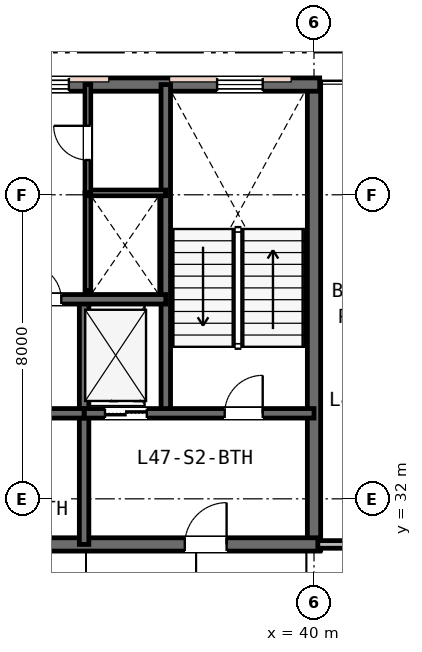
"""IFC4 building model, lengths in metres.
Left out: names, types, materials, properties, quantities, classifications, styles, units other than length and angle.
Written with IfcOpenShell. Run it as: python <this file> out.ifc"""

import sys

from ifc_helpers import new_model, si_unit, direction, frame, frame_2d, origin, place, context, subcontext, project, spatial, rectangle, extrude, element, fill, save


model = new_model("IFC4")
c1 = context("Model", 3, precision=1e-05, world=origin(), true_north=direction((0.0, 1.0)))
c2 = subcontext(c1, "Body", "Model", "MODEL_VIEW")
j1 = project(units=[si_unit("LENGTHUNIT", "METRE"), si_unit("PLANEANGLEUNIT", "RADIAN")], contexts=[c1])
p1 = place(None, origin())
s1 = spatial("IfcSite", under=j1, at=p1, CompositionType="ELEMENT")
p2 = place(p1, origin())
s2 = spatial("IfcBuilding", under=s1, at=p2, CompositionType="ELEMENT")
p3 = place(p2, frame((0.0, 0.0, 183.0)))
s3 = spatial("IfcBuildingStorey", under=s2, at=p3, CompositionType="ELEMENT", Elevation=183.0)
p4 = place(p3, frame((40.0, 30.65, 0.0), z_axis=(0.0, 0.0, 1.0), x_axis=(0.0, 1.0, 0.0)))
e1 = element("IfcWall", 1, at=p4, inside=s3, PredefinedType="SHEAR", context=c2, shape_type="SweptSolid", body=[
    extrude(rectangle(XDim=12.3, YDim=0.35, at=frame_2d((6.15, 0.0))), origin(), (0.0, 0.0, 1.0), 3.6),
])
p5 = place(p3, frame((15.85, 42.9, 0.0), z_axis=(0.0, 0.0, 1.0), x_axis=(1.0, 0.0, 0.0)))
e2 = element("IfcWall", 2, at=p5, inside=s3, PredefinedType="SHEAR", context=c2, shape_type="SweptSolid", body=[
    extrude(rectangle(XDim=24.3, YDim=0.35, at=frame_2d((12.15, 0.0))), origin(), (0.0, 0.0, 1.0), 3.6),
])
p6 = place(p5, frame((1.6, 0.0, 0.95)))
e3 = element("IfcOpeningElement", 3, at=p6, cuts=e2, PredefinedType="OPENING", context=c2, shape_type="SweptSolid", body=[
    extrude(rectangle(XDim=1.2, YDim=1.6, at=frame_2d((0.6, 0.8))), frame((0.0, 0.185, 0.0), z_axis=(0.0, -1.0, 0.0), x_axis=(1.0, 0.0, 0.0)), (0.0, 0.0, 1.0), 0.37),
])
p7 = place(p5, frame((16.5, 0.0, 0.95)))
e4 = element("IfcOpeningElement", 4, at=p7, cuts=e2, PredefinedType="OPENING", context=c2, shape_type="SweptSolid", body=[
    extrude(rectangle(XDim=1.2, YDim=1.6, at=frame_2d((0.6, 0.8))), frame((0.0, 0.185, 0.0), z_axis=(0.0, -1.0, 0.0), x_axis=(1.0, 0.0, 0.0)), (0.0, 0.0, 1.0), 0.37),
])
p8 = place(p5, frame((21.6, 0.0, 0.95)))
e5 = element("IfcOpeningElement", 5, at=p8, cuts=e2, PredefinedType="OPENING", context=c2, shape_type="SweptSolid", body=[
    extrude(rectangle(XDim=1.2, YDim=1.6, at=frame_2d((0.6, 0.8))), frame((0.0, 0.185, 0.0), z_axis=(0.0, -1.0, 0.0), x_axis=(1.0, 0.0, 0.0)), (0.0, 0.0, 1.0), 0.37),
])
p9 = place(p3, frame((28.95, 30.8, 0.0), z_axis=(0.0, 0.0, 1.0), x_axis=(1.0, 0.0, 0.0)))
e6 = element("IfcWall", 6, at=p9, inside=s3, PredefinedType="SHEAR", context=c2, shape_type="SweptSolid", body=[
    extrude(rectangle(XDim=11.2, YDim=0.35, at=frame_2d((5.6, 0.0))), origin(), (0.0, 0.0, 1.0), 3.6),
])
p10 = place(p9, frame((7.65, 0.0, 0.0)))
e7 = element("IfcOpeningElement", 7, at=p10, cuts=e6, PredefinedType="OPENING", context=c2, shape_type="SweptSolid", body=[
    extrude(rectangle(XDim=1.1, YDim=2.15, at=frame_2d((0.55, 1.075))), frame((0.0, 0.185, 0.0), z_axis=(0.0, -1.0, 0.0), x_axis=(1.0, 0.0, 0.0)), (0.0, 0.0, 1.0), 0.37),
])
p11 = place(p3, frame((36.1, 34.25, 0.0), z_axis=(0.0, 0.0, 1.0), x_axis=(0.0, 1.0, 0.0)))
e8 = element("IfcWall", 8, at=p11, inside=s3, PredefinedType="SHEAR", context=c2, shape_type="SweptSolid", body=[
    extrude(rectangle(XDim=8.65, YDim=0.25, at=frame_2d((4.325, 0.0))), origin(), (0.0, 0.0, 1.0), 3.6),
])
p12 = place(p3, frame((33.95, 30.8, 0.0), z_axis=(0.0, 0.0, 1.0), x_axis=(0.0, 1.0, 0.0)))
e9 = element("IfcWall", 9, at=p12, inside=s3, PredefinedType="SHEAR", context=c2, shape_type="SweptSolid", body=[
    extrude(rectangle(XDim=6.45, YDim=0.25, at=frame_2d((3.225, 0.0))), origin(), (0.0, 0.0, 1.0), 3.6),
])
p13 = place(p3, frame((33.95, 34.25, 0.0), z_axis=(0.0, 0.0, 1.0), x_axis=(1.0, 0.0, 0.0)))
e10 = element("IfcWall", 10, at=p13, inside=s3, PredefinedType="SHEAR", context=c2, shape_type="SweptSolid", body=[
    extrude(rectangle(XDim=6.05, YDim=0.25, at=frame_2d((3.025, 0.0))), origin(), (0.0, 0.0, 1.0), 3.6),
])
p14 = place(p13, frame((3.7, 0.0, 0.0)))
e11 = element("IfcOpeningElement", 11, at=p14, cuts=e10, PredefinedType="OPENING", context=c2, shape_type="SweptSolid", body=[
    extrude(rectangle(XDim=1.0, YDim=2.15, at=frame_2d((0.5, 1.075))), frame((0.0, 0.135, 0.0), z_axis=(0.0, -1.0, 0.0), x_axis=(1.0, 0.0, 0.0)), (0.0, 0.0, 1.0), 0.27),
])
p15 = place(p13, frame((0.55, 0.0, 0.0)))
e12 = element("IfcOpeningElement", 12, at=p15, cuts=e10, PredefinedType="OPENING", context=c2, shape_type="SweptSolid", body=[
    extrude(rectangle(XDim=1.1, YDim=2.15, at=frame_2d((0.55, 1.075))), frame((0.0, 0.135, 0.0), z_axis=(0.0, -1.0, 0.0), x_axis=(1.0, 0.0, 0.0)), (0.0, 0.0, 1.0), 0.27),
])
p16 = place(p3, frame((28.95, 34.25, 0.0), z_axis=(0.0, 0.0, 1.0), x_axis=(1.0, 0.0, 0.0)))
e13 = element("IfcWall", 13, at=p16, inside=s3, PredefinedType="SHEAR", context=c2, shape_type="SweptSolid", body=[
    extrude(rectangle(XDim=5.0, YDim=0.25, at=frame_2d((2.5, 0.0))), origin(), (0.0, 0.0, 1.0), 3.6),
])
p17 = place(p16, frame((1.95, 0.0, 0.0)))
e14 = element("IfcOpeningElement", 14, at=p17, cuts=e13, PredefinedType="OPENING", context=c2, shape_type="SweptSolid", body=[
    extrude(rectangle(XDim=1.0, YDim=2.15, at=frame_2d((0.5, 1.075))), frame((0.0, 0.135, 0.0), z_axis=(0.0, -1.0, 0.0), x_axis=(1.0, 0.0, 0.0)), (0.0, 0.0, 1.0), 0.27),
])
p18 = place(p3, frame((19.9, 37.25, 0.0), z_axis=(0.0, 0.0, 1.0), x_axis=(1.0, 0.0, 0.0)))
e15 = element("IfcWall", 15, at=p18, inside=s3, PredefinedType="SHEAR", context=c2, shape_type="SweptSolid", body=[
    extrude(rectangle(XDim=16.2, YDim=0.25, at=frame_2d((8.1, 0.0))), origin(), (0.0, 0.0, 1.0), 3.6),
])
p19 = place(p18, frame((12.55, 0.0, 0.0)))
e16 = element("IfcOpeningElement", 16, at=p19, cuts=e15, PredefinedType="OPENING", context=c2, shape_type="SweptSolid", body=[
    extrude(rectangle(XDim=0.9, YDim=2.15, at=frame_2d((0.45, 1.075))), frame((0.0, 0.135, 0.0), z_axis=(0.0, -1.0, 0.0), x_axis=(1.0, 0.0, 0.0)), (0.0, 0.0, 1.0), 0.27),
])
p20 = place(p18, frame((2.5, 0.0, 0.0)))
e17 = element("IfcOpeningElement", 17, at=p20, cuts=e15, PredefinedType="OPENING", context=c2, shape_type="SweptSolid", body=[
    extrude(rectangle(XDim=1.05, YDim=2.15, at=frame_2d((0.525, 1.075))), frame((0.0, 0.135, 0.0), z_axis=(0.0, -1.0, 0.0), x_axis=(1.0, 0.0, 0.0)), (0.0, 0.0, 1.0), 0.27),
])
p21 = place(p18, frame((4.4, 0.0, 0.0)))
e18 = element("IfcOpeningElement", 18, at=p21, cuts=e15, PredefinedType="OPENING", context=c2, shape_type="SweptSolid", body=[
    extrude(rectangle(XDim=1.05, YDim=2.15, at=frame_2d((0.525, 1.075))), frame((0.0, 0.135, 0.0), z_axis=(0.0, -1.0, 0.0), x_axis=(1.0, 0.0, 0.0)), (0.0, 0.0, 1.0), 0.27),
])
p22 = place(p18, frame((6.3, 0.0, 0.0)))
e19 = element("IfcOpeningElement", 19, at=p22, cuts=e15, PredefinedType="OPENING", context=c2, shape_type="SweptSolid", body=[
    extrude(rectangle(XDim=1.05, YDim=2.15, at=frame_2d((0.525, 1.075))), frame((0.0, 0.135, 0.0), z_axis=(0.0, -1.0, 0.0), x_axis=(1.0, 0.0, 0.0)), (0.0, 0.0, 1.0), 0.27),
])
p23 = place(p3, frame((34.05, 37.473, 0.0), z_axis=(0.0, 0.0, 1.0), x_axis=(0.0, 1.0, 0.0)))
e20 = element("IfcWall", 20, at=p23, inside=s3, PredefinedType="PLUMBINGWALL", context=c2, shape_type="SweptSolid", body=[
    extrude(rectangle(XDim=2.577, YDim=0.15, at=frame_2d((1.288, 0.0))), origin(), (0.0, 0.0, 1.0), 3.33),
])
p24 = place(p3, frame((34.05, 40.05, 0.0), z_axis=(0.0, 0.0, 1.0), x_axis=(1.0, 0.0, 0.0)))
e21 = element("IfcWall", 21, at=p24, inside=s3, PredefinedType="PARTITIONING", context=c2, shape_type="SweptSolid", body=[
    extrude(rectangle(XDim=2.05, YDim=0.15, at=frame_2d((1.025, 0.0))), origin(), (0.0, 0.0, 1.0), 3.33),
])
p25 = place(p3, frame((34.05, 40.05, 0.0), z_axis=(0.0, 0.0, 1.0), x_axis=(0.0, 1.0, 0.0)))
e22 = element("IfcWall", 22, at=p25, inside=s3, PredefinedType="PARTITIONING", context=c2, shape_type="SweptSolid", body=[
    extrude(rectangle(XDim=2.85, YDim=0.15, at=frame_2d((1.425, 0.0))), origin(), (0.0, 0.0, 1.0), 3.33),
])
p26 = place(p25, frame((0.865, 0.0, 0.0)))
e23 = element("IfcOpeningElement", 23, at=p26, cuts=e22, PredefinedType="OPENING", context=c2, shape_type="SweptSolid", body=[
    extrude(rectangle(XDim=0.9, YDim=2.15, at=frame_2d((0.45, 1.075))), frame((0.0, 0.085, 0.0), z_axis=(0.0, -1.0, 0.0), x_axis=(1.0, 0.0, 0.0)), (0.0, 0.0, 1.0), 0.17),
])
p27 = place(p3, frame((40.1, 30.8, 0.0), z_axis=(0.0, 0.0, 1.0), x_axis=(1.0, 0.0, 0.0)))
e24 = element("IfcWall", 24, at=p27, inside=s3, PredefinedType="PARTITIONING", context=c2, shape_type="SweptSolid", body=[
    extrude(rectangle(XDim=4.1, YDim=0.2, at=frame_2d((2.05, 0.0))), origin(), (0.0, 0.0, 1.0), 2.92),
])
p28 = place(p27, frame((1.575, 0.0, 0.0)))
e25 = element("IfcOpeningElement", 25, at=p28, cuts=e24, PredefinedType="OPENING", context=c2, shape_type="SweptSolid", body=[
    extrude(rectangle(XDim=0.95, YDim=2.15, at=frame_2d((0.475, 1.075))), frame((0.0, 0.11, 0.0), z_axis=(0.0, -1.0, 0.0), x_axis=(1.0, 0.0, 0.0)), (0.0, 0.0, 1.0), 0.22),
])
p29 = place(p7, origin())
e26 = element("IfcWindow", 26, at=p29, inside=s3, PartitioningType="SINGLE_PANEL", PredefinedType="WINDOW", context=c2, shape_type="SweptSolid", body=[
    extrude(rectangle(XDim=1.2, YDim=1.6, at=frame_2d((0.6, 0.8))), frame((0.0, 0.03, 0.0), z_axis=(0.0, -1.0, 0.0), x_axis=(1.0, 0.0, 0.0)), (0.0, 0.0, 1.0), 0.06),
])
fill(e4, e26)
p30 = place(p8, origin())
e27 = element("IfcWindow", 27, at=p30, inside=s3, PartitioningType="SINGLE_PANEL", PredefinedType="WINDOW", context=c2, shape_type="SweptSolid", body=[
    extrude(rectangle(XDim=1.2, YDim=1.6, at=frame_2d((0.6, 0.8))), frame((0.0, 0.03, 0.0), z_axis=(0.0, -1.0, 0.0), x_axis=(1.0, 0.0, 0.0)), (0.0, 0.0, 1.0), 0.06),
])
fill(e5, e27)
p31 = place(p14, origin())
e28 = element("IfcDoor", 28, at=p31, inside=s3, OperationType="SINGLE_SWING_RIGHT", PredefinedType="DOOR", context=c2, shape_type="SweptSolid", body=[
    extrude(rectangle(XDim=1.0, YDim=2.15, at=frame_2d((0.5, 1.075))), frame((0.0, 0.025, 0.0), z_axis=(0.0, -1.0, 0.0), x_axis=(1.0, 0.0, 0.0)), (0.0, 0.0, 1.0), 0.05),
])
fill(e11, e28)
p32 = place(p10, origin())
e29 = element("IfcDoor", 29, at=p32, inside=s3, OperationType="SINGLE_SWING_RIGHT", PredefinedType="DOOR", context=c2, shape_type="SweptSolid", body=[
    extrude(rectangle(XDim=1.1, YDim=2.15, at=frame_2d((0.55, 1.075))), frame((0.0, 0.025, 0.0), z_axis=(0.0, -1.0, 0.0), x_axis=(1.0, 0.0, 0.0)), (0.0, 0.0, 1.0), 0.05),
])
fill(e7, e29)
p33 = place(p19, origin())
e30 = element("IfcDoor", 30, at=p33, inside=s3, OperationType="SINGLE_SWING_LEFT", PredefinedType="DOOR", context=c2, shape_type="SweptSolid", body=[
    extrude(rectangle(XDim=0.9, YDim=2.15, at=frame_2d((0.45, 1.075))), frame((0.0, 0.025, 0.0), z_axis=(0.0, -1.0, 0.0), x_axis=(1.0, 0.0, 0.0)), (0.0, 0.0, 1.0), 0.05),
])
fill(e16, e30)
p34 = place(p26, origin())
e31 = element("IfcDoor", 31, at=p34, inside=s3, OperationType="SINGLE_SWING_RIGHT", PredefinedType="DOOR", context=c2, shape_type="SweptSolid", body=[
    extrude(rectangle(XDim=0.9, YDim=2.15, at=frame_2d((0.45, 1.075))), frame((0.0, 0.025, 0.0), z_axis=(0.0, -1.0, 0.0), x_axis=(1.0, 0.0, 0.0)), (0.0, 0.0, 1.0), 0.05),
])
fill(e23, e31)
p35 = place(p15, origin())
e32 = element("IfcDoor", 32, at=p35, inside=s3, OperationType="DOUBLE_DOOR_SLIDING", PredefinedType="DOOR", context=c2, shape_type="SweptSolid", body=[
    extrude(rectangle(XDim=1.1, YDim=2.15, at=frame_2d((0.55, 1.075))), frame((0.0, 0.025, 0.0), z_axis=(0.0, -1.0, 0.0), x_axis=(1.0, 0.0, 0.0)), (0.0, 0.0, 1.0), 0.05),
])
fill(e12, e32)
save(model, sys.argv[1])
